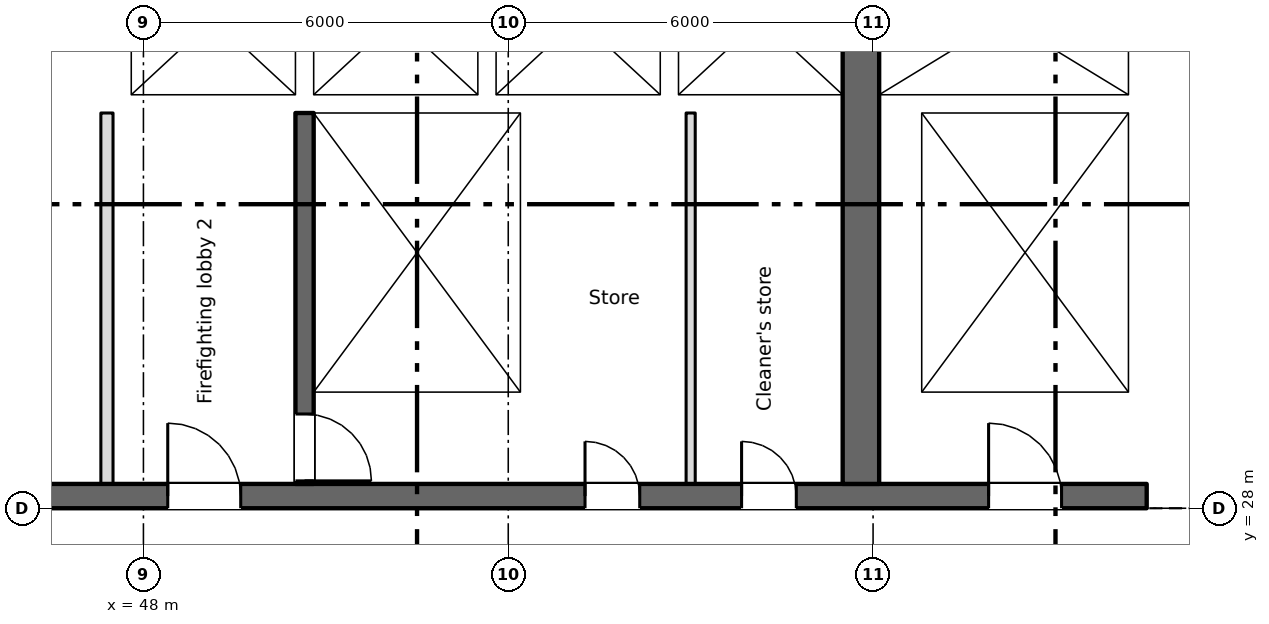
"""IFC4 building model, lengths in metres.
Left out: names, types, materials, properties, quantities, classifications, styles, units other than length and angle.
Written with IfcOpenShell. Run it as: python <this file> out.ifc"""

import sys

from ifc_helpers import new_model, si_unit, direction, frame, frame_2d, origin, place, context, subcontext, project, spatial, rectangle, extrude, element, fill, save


model = new_model("IFC4")
c1 = context("Model", 3, precision=1e-05, world=origin(), true_north=direction((0.0, 1.0)))
c2 = subcontext(c1, "Body", "Model", "MODEL_VIEW")
j1 = project(units=[si_unit("LENGTHUNIT", "METRE"), si_unit("PLANEANGLEUNIT", "RADIAN")], contexts=[c1])
p1 = place(None, origin())
s1 = spatial("IfcSite", under=j1, at=p1, CompositionType="ELEMENT")
p2 = place(p1, origin())
s2 = spatial("IfcBuilding", under=s1, at=p2, CompositionType="ELEMENT")
p3 = place(p2, frame((0.0, 0.0, 239.35)))
s3 = spatial("IfcBuildingStorey", under=s2, at=p3, CompositionType="ELEMENT", Elevation=239.35)
p4 = place(p3, frame((6.5, 28.2, 0.0), z_axis=(0.0, 0.0, 1.0), x_axis=(1.0, 0.0, 0.0)))
e1 = element("IfcWall", 1, at=p4, inside=s3, PredefinedType="SHEAR", context=c2, shape_type="SweptSolid", body=[
    extrude(rectangle(XDim=58.0, YDim=0.4, at=frame_2d((29.0, 0.0))), origin(), (0.0, 0.0, 1.0), 3.4),
])
p5 = place(p4, frame((14.05, 0.0, 0.0)))
e2 = element("IfcOpeningElement", 2, at=p5, cuts=e1, PredefinedType="OPENING", context=c2, shape_type="SweptSolid", body=[
    extrude(rectangle(XDim=0.9, YDim=2.1, at=frame_2d((0.45, 1.05))), frame((0.0, 0.21, 0.0), z_axis=(0.0, -1.0, 0.0), x_axis=(1.0, 0.0, 0.0)), (0.0, 0.0, 1.0), 0.42),
])
p6 = place(p4, frame((48.762, 0.0, 0.0)))
e3 = element("IfcOpeningElement", 3, at=p6, cuts=e1, PredefinedType="OPENING", context=c2, shape_type="SweptSolid", body=[
    extrude(rectangle(XDim=0.9, YDim=2.1, at=frame_2d((0.45, 1.05))), frame((0.0, 0.21, 0.0), z_axis=(0.0, -1.0, 0.0), x_axis=(1.0, 0.0, 0.0)), (0.0, 0.0, 1.0), 0.42),
])
p7 = place(p4, frame((51.337, 0.0, 0.0)))
e4 = element("IfcOpeningElement", 4, at=p7, cuts=e1, PredefinedType="OPENING", context=c2, shape_type="SweptSolid", body=[
    extrude(rectangle(XDim=0.9, YDim=2.1, at=frame_2d((0.45, 1.05))), frame((0.0, 0.21, 0.0), z_axis=(0.0, -1.0, 0.0), x_axis=(1.0, 0.0, 0.0)), (0.0, 0.0, 1.0), 0.42),
])
p8 = place(p4, frame((1.55, 0.0, 0.0)))
e5 = element("IfcOpeningElement", 5, at=p8, cuts=e1, PredefinedType="OPENING", context=c2, shape_type="SweptSolid", body=[
    extrude(rectangle(XDim=0.9, YDim=2.1, at=frame_2d((0.45, 1.05))), frame((0.0, 0.21, 0.0), z_axis=(0.0, -1.0, 0.0), x_axis=(1.0, 0.0, 0.0)), (0.0, 0.0, 1.0), 0.42),
])
p9 = place(p4, frame((4.9, 0.0, 0.0)))
e6 = element("IfcOpeningElement", 6, at=p9, cuts=e1, PredefinedType="OPENING", context=c2, shape_type="SweptSolid", body=[
    extrude(rectangle(XDim=1.2, YDim=2.1, at=frame_2d((0.6, 1.05))), frame((0.0, 0.21, 0.0), z_axis=(0.0, -1.0, 0.0), x_axis=(1.0, 0.0, 0.0)), (0.0, 0.0, 1.0), 0.42),
])
p10 = place(p4, frame((31.9, 0.0, 0.0)))
e7 = element("IfcOpeningElement", 7, at=p10, cuts=e1, PredefinedType="OPENING", context=c2, shape_type="SweptSolid", body=[
    extrude(rectangle(XDim=1.2, YDim=2.1, at=frame_2d((0.6, 1.05))), frame((0.0, 0.21, 0.0), z_axis=(0.0, -1.0, 0.0), x_axis=(1.0, 0.0, 0.0)), (0.0, 0.0, 1.0), 0.42),
])
p11 = place(p4, frame((55.4, 0.0, 0.0)))
e8 = element("IfcOpeningElement", 8, at=p11, cuts=e1, PredefinedType="OPENING", context=c2, shape_type="SweptSolid", body=[
    extrude(rectangle(XDim=1.2, YDim=2.1, at=frame_2d((0.6, 1.05))), frame((0.0, 0.21, 0.0), z_axis=(0.0, -1.0, 0.0), x_axis=(1.0, 0.0, 0.0)), (0.0, 0.0, 1.0), 0.42),
])
p12 = place(p4, frame((21.9, 0.0, 0.0)))
e9 = element("IfcOpeningElement", 9, at=p12, cuts=e1, PredefinedType="OPENING", context=c2, shape_type="SweptSolid", body=[
    extrude(rectangle(XDim=1.2, YDim=2.1, at=frame_2d((0.6, 1.05))), frame((0.0, 0.21, 0.0), z_axis=(0.0, -1.0, 0.0), x_axis=(1.0, 0.0, 0.0)), (0.0, 0.0, 1.0), 0.42),
])
p13 = place(p4, frame((41.9, 0.0, 0.0)))
e10 = element("IfcOpeningElement", 10, at=p13, cuts=e1, PredefinedType="OPENING", context=c2, shape_type="SweptSolid", body=[
    extrude(rectangle(XDim=1.2, YDim=2.1, at=frame_2d((0.6, 1.05))), frame((0.0, 0.21, 0.0), z_axis=(0.0, -1.0, 0.0), x_axis=(1.0, 0.0, 0.0)), (0.0, 0.0, 1.0), 0.42),
])
p14 = place(p4, frame((25.05, 0.0, 0.0)))
e11 = element("IfcOpeningElement", 11, at=p14, cuts=e1, PredefinedType="OPENING", context=c2, shape_type="SweptSolid", body=[
    extrude(rectangle(XDim=2.4, YDim=2.1, at=frame_2d((1.2, 1.05))), frame((0.0, 0.21, 0.0), z_axis=(0.0, -1.0, 0.0), x_axis=(1.0, 0.0, 0.0)), (0.0, 0.0, 1.0), 0.42),
])
p15 = place(p4, frame((37.55, 0.0, 0.0)))
e12 = element("IfcOpeningElement", 12, at=p15, cuts=e1, PredefinedType="OPENING", context=c2, shape_type="SweptSolid", body=[
    extrude(rectangle(XDim=2.4, YDim=2.1, at=frame_2d((1.2, 1.05))), frame((0.0, 0.21, 0.0), z_axis=(0.0, -1.0, 0.0), x_axis=(1.0, 0.0, 0.0)), (0.0, 0.0, 1.0), 0.42),
])
p16 = place(p4, frame((8.25, 0.0, 0.0)))
e13 = element("IfcOpeningElement", 13, at=p16, cuts=e1, PredefinedType="OPENING", context=c2, shape_type="SweptSolid", body=[
    extrude(rectangle(XDim=2.4, YDim=2.1, at=frame_2d((1.2, 1.05))), frame((0.0, 0.21, 0.0), z_axis=(0.0, -1.0, 0.0), x_axis=(1.0, 0.0, 0.0)), (0.0, 0.0, 1.0), 0.42),
])
p17 = place(p4, frame((29.05, 0.0, 0.0)))
e14 = element("IfcOpeningElement", 14, at=p17, cuts=e1, PredefinedType="OPENING", context=c2, shape_type="SweptSolid", body=[
    extrude(rectangle(XDim=0.9, YDim=2.1, at=frame_2d((0.45, 1.05))), frame((0.0, 0.21, 0.0), z_axis=(0.0, -1.0, 0.0), x_axis=(1.0, 0.0, 0.0)), (0.0, 0.0, 1.0), 0.42),
])
p18 = place(p4, frame((35.05, 0.0, 0.0)))
e15 = element("IfcOpeningElement", 15, at=p18, cuts=e1, PredefinedType="OPENING", context=c2, shape_type="SweptSolid", body=[
    extrude(rectangle(XDim=0.9, YDim=2.1, at=frame_2d((0.45, 1.05))), frame((0.0, 0.21, 0.0), z_axis=(0.0, -1.0, 0.0), x_axis=(1.0, 0.0, 0.0)), (0.0, 0.0, 1.0), 0.42),
])
p19 = place(p3, frame((64.35, 34.8, 0.0), z_axis=(0.0, 0.0, 1.0), x_axis=(0.0, 1.0, 0.0)))
e16 = element("IfcWall", 16, at=p19, inside=s3, PredefinedType="SHEAR", context=c2, shape_type="SweptSolid", body=[
    extrude(rectangle(XDim=6.45, YDim=0.3, at=frame_2d((3.225, 0.0))), origin(), (0.0, 0.0, 1.0), 3.4),
])
p20 = place(p3, frame((59.8, 28.4, 0.0), z_axis=(0.0, 0.0, 1.0), x_axis=(0.0, 1.0, 0.0)))
e17 = element("IfcWall", 17, at=p20, inside=s3, PredefinedType="SHEAR", context=c2, shape_type="SweptSolid", body=[
    extrude(rectangle(XDim=15.1, YDim=0.6, at=frame_2d((7.55, 0.0))), origin(), (0.0, 0.0, 1.0), 3.4),
])
p21 = place(p20, frame((9.6, 0.0, 0.0)))
e18 = element("IfcOpeningElement", 18, at=p21, cuts=e17, PredefinedType="OPENING", context=c2, shape_type="SweptSolid", body=[
    extrude(rectangle(XDim=2.0, YDim=2.1, at=frame_2d((1.0, 1.05))), frame((0.0, 0.31, 0.0), z_axis=(0.0, -1.0, 0.0), x_axis=(1.0, 0.0, 0.0)), (0.0, 0.0, 1.0), 0.62),
])
p22 = place(p3, frame((50.65, 34.5, 0.0), z_axis=(0.0, 0.0, 1.0), x_axis=(0.0, -1.0, 0.0)))
e19 = element("IfcWall", 19, at=p22, inside=s3, PredefinedType="SHEAR", context=c2, shape_type="SweptSolid", body=[
    extrude(rectangle(XDim=6.1, YDim=0.3, at=frame_2d((3.05, 0.0))), origin(), (0.0, 0.0, 1.0), 3.4),
])
p23 = place(p22, frame((4.95, 0.0, 0.0)))
e20 = element("IfcOpeningElement", 20, at=p23, cuts=e19, PredefinedType="OPENING", context=c2, shape_type="SweptSolid", body=[
    extrude(rectangle(XDim=1.1, YDim=2.1, at=frame_2d((0.55, 1.05))), frame((0.0, 0.16, 0.0), z_axis=(0.0, -1.0, 0.0), x_axis=(1.0, 0.0, 0.0)), (0.0, 0.0, 1.0), 0.32),
])
p24 = place(p3, frame((54.35, 28.4, 0.0), z_axis=(0.0, 0.0, 1.0), x_axis=(0.0, 1.0, 0.0)))
e21 = element("IfcWall", 21, at=p24, inside=s3, PredefinedType="SHEAR", context=c2, shape_type="SweptSolid", body=[
    extrude(rectangle(XDim=6.1, YDim=0.3, at=frame_2d((3.05, 0.0))), origin(), (0.0, 0.0, 1.0), 3.4),
])
p25 = place(p3, frame((60.45, 28.4, 0.0), z_axis=(0.0, 0.0, 1.0), x_axis=(0.0, 1.0, 0.0)))
e22 = element("IfcWall", 22, at=p25, inside=s3, PredefinedType="SHEAR", context=c2, shape_type="SweptSolid", body=[
    extrude(rectangle(XDim=6.1, YDim=0.7, at=frame_2d((3.05, 0.0))), origin(), (0.0, 0.0, 1.0), 3.4),
])
p26 = place(p3, frame((64.35, 28.4, 0.0), z_axis=(0.0, 0.0, 1.0), x_axis=(0.0, 1.0, 0.0)))
e23 = element("IfcWall", 23, at=p26, inside=s3, PredefinedType="SHEAR", context=c2, shape_type="SweptSolid", body=[
    extrude(rectangle(XDim=6.1, YDim=0.3, at=frame_2d((3.05, 0.0))), origin(), (0.0, 0.0, 1.0), 3.4),
])
p27 = place(p3, frame((47.3, 34.65, 0.0), z_axis=(0.0, 0.0, 1.0), x_axis=(1.0, 0.0, 0.0)))
e24 = element("IfcWall", 24, at=p27, inside=s3, PredefinedType="SHEAR", context=c2, shape_type="SweptSolid", body=[
    extrude(rectangle(XDim=12.2, YDim=0.3, at=frame_2d((6.1, 0.0))), origin(), (0.0, 0.0, 1.0), 3.4),
])
p28 = place(p27, frame((1.3, 0.0, 0.0)))
e25 = element("IfcOpeningElement", 25, at=p28, cuts=e24, PredefinedType="OPENING", context=c2, shape_type="SweptSolid", body=[
    extrude(rectangle(XDim=1.1, YDim=2.1, at=frame_2d((0.55, 1.05))), frame((0.0, 0.16, 0.0), z_axis=(0.0, -1.0, 0.0), x_axis=(1.0, 0.0, 0.0)), (0.0, 0.0, 1.0), 0.32),
])
p29 = place(p3, frame((60.1, 34.65, 0.0), z_axis=(0.0, 0.0, 1.0), x_axis=(1.0, 0.0, 0.0)))
e26 = element("IfcWall", 26, at=p29, inside=s3, PredefinedType="SHEAR", context=c2, shape_type="SweptSolid", body=[
    extrude(rectangle(XDim=4.4, YDim=0.3, at=frame_2d((2.2, 0.0))), origin(), (0.0, 0.0, 1.0), 3.4),
])
p30 = place(p3, frame((47.55, 34.8, 0.0), z_axis=(0.0, 0.0, 1.0), x_axis=(0.0, 1.0, 0.0)))
e27 = element("IfcWall", 27, at=p30, inside=s3, PredefinedType="SHEAR", context=c2, shape_type="SweptSolid", body=[
    extrude(rectangle(XDim=2.5, YDim=0.5, at=frame_2d((1.25, 0.0))), origin(), (0.0, 0.0, 1.0), 3.4),
])
for number, where, z_axis, x_axis in (
    (28, (50.65, 34.8, 0.0), (0.0, 0.0, 1.0), (0.0, 1.0, 0.0)),
    (29, (53.65, 34.8, 0.0), (0.0, 0.0, 1.0), (0.0, 1.0, 0.0)),
    (30, (56.65, 34.8, 0.0), (0.0, 0.0, 1.0), (0.0, 1.0, 0.0)),
):
    element("IfcWall", number, at=place(p3, frame(where, z_axis=z_axis, x_axis=x_axis)), inside=s3, PredefinedType="SHEAR", context=c2, shape_type="SweptSolid", body=[
        extrude(rectangle(XDim=2.5, YDim=0.3, at=frame_2d((1.25, 0.0))), origin(), (0.0, 0.0, 1.0), 3.4),
    ])
p31 = place(p3, frame((47.4, 28.4, 0.0), z_axis=(0.0, 0.0, 1.0), x_axis=(0.0, 1.0, 0.0)))
e31 = element("IfcWall", 31, at=p31, inside=s3, PredefinedType="PARTITIONING", context=c2, shape_type="SweptSolid", body=[
    extrude(rectangle(XDim=6.1, YDim=0.2, at=frame_2d((3.05, 0.0))), origin(), (0.0, 0.0, 1.0), 3.4),
])
p32 = place(p3, frame((57.0, 28.4, 0.0), z_axis=(0.0, 0.0, 1.0), x_axis=(0.0, 1.0, 0.0)))
e32 = element("IfcWall", 32, at=p32, inside=s3, PredefinedType="PARTITIONING", context=c2, shape_type="SweptSolid", body=[
    extrude(rectangle(XDim=6.1, YDim=0.15, at=frame_2d((3.05, 0.0))), origin(), (0.0, 0.0, 1.0), 3.4),
])
p33 = place(p6, origin())
e33 = element("IfcDoor", 33, at=p33, inside=s3, OperationType="SINGLE_SWING_LEFT", PredefinedType="DOOR", context=c2, shape_type="SweptSolid", body=[
    extrude(rectangle(XDim=0.9, YDim=2.1, at=frame_2d((0.45, 1.05))), frame((0.0, 0.025, 0.0), z_axis=(0.0, -1.0, 0.0), x_axis=(1.0, 0.0, 0.0)), (0.0, 0.0, 1.0), 0.05),
])
fill(e3, e33)
p34 = place(p7, origin())
e34 = element("IfcDoor", 34, at=p34, inside=s3, OperationType="SINGLE_SWING_LEFT", PredefinedType="DOOR", context=c2, shape_type="SweptSolid", body=[
    extrude(rectangle(XDim=0.9, YDim=2.1, at=frame_2d((0.45, 1.05))), frame((0.0, 0.025, 0.0), z_axis=(0.0, -1.0, 0.0), x_axis=(1.0, 0.0, 0.0)), (0.0, 0.0, 1.0), 0.05),
])
fill(e4, e34)
p35 = place(p28, origin())
e35 = element("IfcDoor", 35, at=p35, inside=s3, OperationType="SLIDING_TO_LEFT", PredefinedType="DOOR", context=c2, shape_type="SweptSolid", body=[
    extrude(rectangle(XDim=1.1, YDim=2.1, at=frame_2d((0.55, 1.05))), frame((0.0, 0.025, 0.0), z_axis=(0.0, -1.0, 0.0), x_axis=(1.0, 0.0, 0.0)), (0.0, 0.0, 1.0), 0.05),
])
fill(e25, e35)
p36 = place(p23, origin())
e36 = element("IfcDoor", 36, at=p36, inside=s3, OperationType="SINGLE_SWING_RIGHT", PredefinedType="DOOR", context=c2, shape_type="SweptSolid", body=[
    extrude(rectangle(XDim=1.1, YDim=2.1, at=frame_2d((0.55, 1.05))), frame((0.0, 0.025, 0.0), z_axis=(0.0, -1.0, 0.0), x_axis=(1.0, 0.0, 0.0)), (0.0, 0.0, 1.0), 0.05),
])
fill(e20, e36)
p37 = place(p11, origin())
e37 = element("IfcDoor", 37, at=p37, inside=s3, OperationType="SINGLE_SWING_LEFT", PredefinedType="DOOR", context=c2, shape_type="SweptSolid", body=[
    extrude(rectangle(XDim=1.2, YDim=2.1, at=frame_2d((0.6, 1.05))), frame((0.0, 0.025, 0.0), z_axis=(0.0, -1.0, 0.0), x_axis=(1.0, 0.0, 0.0)), (0.0, 0.0, 1.0), 0.05),
])
fill(e8, e37)
p38 = place(p13, origin())
e38 = element("IfcDoor", 38, at=p38, inside=s3, OperationType="SINGLE_SWING_LEFT", PredefinedType="DOOR", context=c2, shape_type="SweptSolid", body=[
    extrude(rectangle(XDim=1.2, YDim=2.1, at=frame_2d((0.6, 1.05))), frame((0.0, 0.025, 0.0), z_axis=(0.0, -1.0, 0.0), x_axis=(1.0, 0.0, 0.0)), (0.0, 0.0, 1.0), 0.05),
])
fill(e10, e38)
save(model, sys.argv[1])
